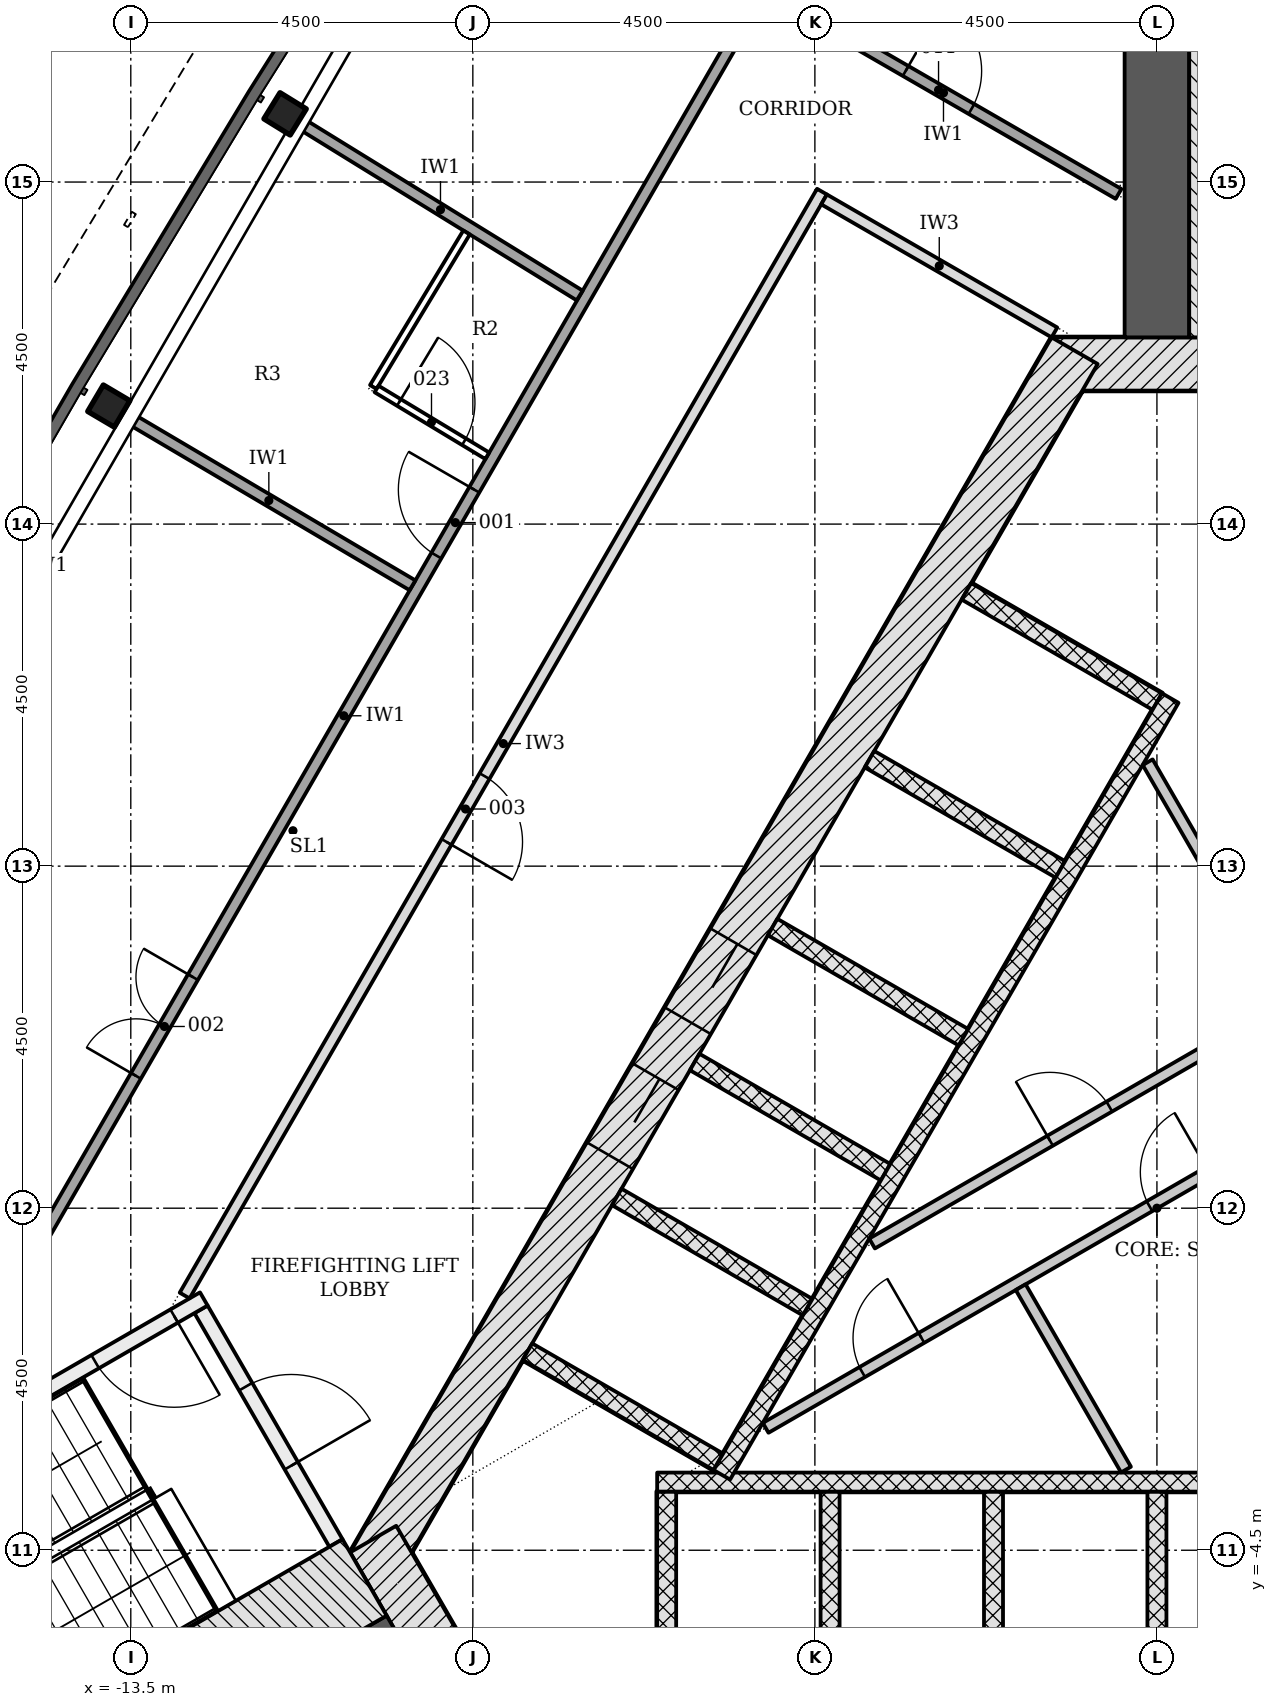
"""IFC4 building model, lengths in metres.
Left out: names, types, materials, properties, quantities, classifications, styles, units other than length and angle.
Written with IfcOpenShell. Run it as: python <this file> out.ifc"""

import sys

from ifc_helpers import new_model, si_unit, direction, frame, frame_2d, origin, origin_2d, place, context, subcontext, project, spatial, rectangle, i_section, extrude, element, fill, save


model = new_model("IFC4")
c1 = context("Model", 3, precision=1e-05, world=origin(), true_north=direction((0.0, 1.0)))
c2 = subcontext(c1, "Body", "Model", "MODEL_VIEW")
j1 = project(units=[si_unit("LENGTHUNIT", "METRE"), si_unit("PLANEANGLEUNIT", "RADIAN")], contexts=[c1])
p1 = place(None, origin())
s1 = spatial("IfcSite", under=j1, at=p1, CompositionType="ELEMENT")
p2 = place(p1, origin())
s2 = spatial("IfcBuilding", under=s1, at=p2, CompositionType="ELEMENT")
p3 = place(p2, frame((0.0, 0.0, 72.6)))
s3 = spatial("IfcBuildingStorey", under=s2, at=p3, CompositionType="ELEMENT", Elevation=72.6)
p4 = place(p3, frame((1.386, 11.106, -0.2), z_axis=(0.0, 0.0, 1.0), x_axis=(-1.0, 0.0, 0.0)))
e1 = element("IfcWall", 1, at=p4, inside=s3, PredefinedType="SHEAR", context=c2, shape_type="SweptSolid", body=[
    extrude(rectangle(XDim=2.771, YDim=0.7, at=frame_2d((1.386, 0.0))), origin(), (0.0, 0.0, 1.0), 3.6),
])
p5 = place(p3, frame((-1.083, 11.281, -0.2), z_axis=(0.0, 0.0, 1.0), x_axis=(-0.500001446645, -0.866024568562, 0.0)))
e2 = element("IfcWall", 2, at=p5, inside=s3, PredefinedType="SHEAR", context=c2, shape_type="SweptSolid", body=[
    extrude(rectangle(XDim=18.458, YDim=0.7, at=frame_2d((9.229, 0.0))), origin(), (0.0, 0.0, 1.0), 3.6),
])
p6 = place(p5, frame((8.979, 0.0, 0.2)))
e3 = element("IfcOpeningElement", 3, at=p6, cuts=e2, PredefinedType="OPENING", context=c2, shape_type="SweptSolid", body=[
    extrude(rectangle(XDim=1.2, YDim=2.1, at=frame_2d((0.6, 1.05))), frame((0.0, 0.36, 0.0), z_axis=(0.0, -1.0, 0.0), x_axis=(1.0, 0.0, 0.0)), (0.0, 0.0, 1.0), 0.72),
])
p7 = place(p5, frame((11.029, 0.0, 0.2)))
e4 = element("IfcOpeningElement", 4, at=p7, cuts=e2, PredefinedType="OPENING", context=c2, shape_type="SweptSolid", body=[
    extrude(rectangle(XDim=1.2, YDim=2.1, at=frame_2d((0.6, 1.05))), frame((0.0, 0.36, 0.0), z_axis=(0.0, -1.0, 0.0), x_axis=(1.0, 0.0, 0.0)), (0.0, 0.0, 1.0), 0.72),
])
p8 = place(p3, frame((-10.311, -4.353, -0.2), z_axis=(0.0, 0.0, 1.0), x_axis=(0.500042739161, -0.866000726912, 0.0)))
e5 = element("IfcWall", 5, at=p8, inside=s3, PredefinedType="SHEAR", context=c2, shape_type="SweptSolid", body=[
    extrude(rectangle(XDim=2.771, YDim=0.7, at=frame_2d((1.386, 0.0))), origin(), (0.0, 0.0, 1.0), 3.6),
])
p9 = place(p3, frame((0.0, 11.456, -0.2), z_axis=(0.0, 0.0, 1.0), x_axis=(0.0, 1.0, 0.0)))
e6 = element("IfcWall", 6, at=p9, inside=s3, PredefinedType="SHEAR", context=c2, shape_type="SweptSolid", body=[
    extrude(rectangle(XDim=13.382, YDim=0.85, at=frame_2d((6.691, 0.0))), origin(), (0.0, 0.0, 1.0), 3.6),
])
p10 = place(p3, frame((-9.922, -5.728, -0.2), z_axis=(0.0, 0.0, 1.0), x_axis=(-0.866026077102, -0.499998833779, 0.0)))
e7 = element("IfcWall", 7, at=p10, inside=s3, PredefinedType="SHEAR", context=c2, shape_type="SweptSolid", body=[
    extrude(rectangle(XDim=13.381, YDim=0.85, at=frame_2d((6.691, 0.0))), origin(), (0.0, 0.0, 1.0), 3.6),
])
for number, where, z_axis, x_axis in (
    (8, (-11.47, 14.397, -0.2), (0.0, 0.0, 1.0), (-0.525, -0.851, 0.0)),
    (9, (-13.789, 10.553, -0.2), (0.0, 0.0, 1.0), (-0.508, -0.861, 0.0)),
):
    element("IfcColumn", number, at=place(p3, frame(where, z_axis=z_axis, x_axis=x_axis)), inside=s3, PredefinedType="COLUMN", context=c2, shape_type="SweptSolid", body=[
        extrude(i_section(OverallWidth=0.404, OverallDepth=0.406, WebThickness=0.027, FlangeThickness=0.044, FilletRadius=0.015, at=origin_2d()), origin(), (0.0, 0.0, 1.0), 3.6),
    ])
for number, where, z_axis, x_axis in (
    (10, (-6.45, -6.228, -0.2), (0.0, 0.0, 1.0), (0.0, 1.0, 0.0)),
    (11, (-4.3, -6.228, -0.2), (0.0, 0.0, 1.0), (0.0, 1.0, 0.0)),
    (12, (-2.15, -6.228, -0.2), (0.0, 0.0, 1.0), (0.0, 1.0, 0.0)),
    (13, (0.0, -6.228, -0.2), (0.0, 0.0, 1.0), (0.0, 1.0, 0.0)),
):
    element("IfcWall", number, at=place(p3, frame(where, z_axis=z_axis, x_axis=x_axis)), inside=s3, PredefinedType="PARTITIONING", context=c2, shape_type="SweptSolid", body=[
        extrude(rectangle(XDim=2.5, YDim=0.25, at=frame_2d((1.25, 0.0))), origin(), (0.0, 0.0, 1.0), 3.6),
    ])
p11 = place(p3, frame((-6.575, -3.603, 0.0), z_axis=(0.0, 0.0, 1.0), x_axis=(1.0, 0.0, 0.0)))
e14 = element("IfcWall", 14, at=p11, inside=s3, PredefinedType="PARTITIONING", context=c2, shape_type="SweptSolid", body=[
    extrude(rectangle(XDim=13.15, YDim=0.25, at=frame_2d((6.575, 0.0))), origin(), (0.0, 0.0, 1.0), 3.4),
])
p12 = place(p3, frame((-2.506, 8.115, -0.2), z_axis=(0.0, 0.0, 1.0), x_axis=(0.865996321171, -0.50005036918, 0.0)))
e15 = element("IfcWall", 15, at=p12, inside=s3, PredefinedType="PARTITIONING", context=c2, shape_type="SweptSolid", body=[
    extrude(rectangle(XDim=2.9, YDim=0.25, at=frame_2d((1.45, 0.0))), origin(), (0.0, 0.0, 1.0), 3.6),
])
for number, where, z_axis, x_axis in (
    (16, (-3.781, 5.907, -0.2), (0.0, 0.0, 1.0), (0.866, -0.5, 0.0)),
    (17, (-5.056, 3.699, -0.2), (0.0, 0.0, 1.0), (0.866, -0.5, 0.0)),
    (18, (-6.081, 1.923, -0.2), (0.0, 0.0, 1.0), (0.866, -0.5, 0.0)),
    (19, (-7.106, 0.148, -0.2), (0.0, 0.0, 1.0), (0.866, -0.5, 0.0)),
    (20, (-8.281, -1.887, -0.2), (0.0, 0.0, 1.0), (0.866, -0.5, 0.0)),
):
    element("IfcWall", number, at=place(p3, frame(where, z_axis=z_axis, x_axis=x_axis)), inside=s3, PredefinedType="PARTITIONING", context=c2, shape_type="SweptSolid", body=[
        extrude(rectangle(XDim=2.9, YDim=0.25, at=frame_2d((1.45, 0.0))), origin(), (0.0, 0.0, 1.0), 3.6),
    ])
p13 = place(p3, frame((0.176, 6.711, 0.0), z_axis=(0.0, 0.0, 1.0), x_axis=(-0.500004227369, -0.866022963098, 0.0)))
e21 = element("IfcWall", 21, at=p13, inside=s3, PredefinedType="PARTITIONING", context=c2, shape_type="SweptSolid", body=[
    extrude(rectangle(XDim=11.8, YDim=0.25, at=frame_2d((5.9, 0.0))), origin(), (0.0, 0.0, 1.0), 3.4),
])
p14 = place(p3, frame((-5.148, -2.89, 0.0), z_axis=(0.0, 0.0, 1.0), x_axis=(0.866030081544, 0.499991897794, 0.0)))
e22 = element("IfcWall", 22, at=p14, inside=s3, PredefinedType="PARTITIONING", context=c2, shape_type="SweptSolid", body=[
    extrude(rectangle(XDim=12.131, YDim=0.15, at=frame_2d((6.065, 0.0))), origin(), (0.0, 0.0, 1.0), 3.4),
])
p15 = place(p14, frame((5.831, 0.0, 0.0)))
e23 = element("IfcOpeningElement", 23, at=p15, cuts=e22, PredefinedType="OPENING", context=c2, shape_type="SweptSolid", body=[
    extrude(rectangle(XDim=0.9, YDim=2.1, at=frame_2d((0.45, 1.05))), frame((0.0, 0.085, 0.0), z_axis=(0.0, -1.0, 0.0), x_axis=(1.0, 0.0, 0.0)), (0.0, 0.0, 1.0), 0.17),
])
p16 = place(p14, frame((1.467, 0.0, 0.0)))
e24 = element("IfcOpeningElement", 24, at=p16, cuts=e22, PredefinedType="OPENING", context=c2, shape_type="SweptSolid", body=[
    extrude(rectangle(XDim=0.9, YDim=2.1, at=frame_2d((0.45, 1.05))), frame((0.0, 0.085, 0.0), z_axis=(0.0, -1.0, 0.0), x_axis=(1.0, 0.0, 0.0)), (0.0, 0.0, 1.0), 0.17),
])
p17 = place(p3, frame((-3.748, -0.465, 0.0), z_axis=(0.0, 0.0, 1.0), x_axis=(0.866033540873, 0.499985905884, 0.0)))
e25 = element("IfcWall", 25, at=p17, inside=s3, PredefinedType="PARTITIONING", context=c2, shape_type="SweptSolid", body=[
    extrude(rectangle(XDim=9.706, YDim=0.15, at=frame_2d((4.853, 0.0))), origin(), (0.0, 0.0, 1.0), 3.4),
])
p18 = place(p17, frame((2.704, 0.0, 0.0)))
e26 = element("IfcOpeningElement", 26, at=p18, cuts=e25, PredefinedType="OPENING", context=c2, shape_type="SweptSolid", body=[
    extrude(rectangle(XDim=0.9, YDim=2.1, at=frame_2d((0.45, 1.05))), frame((0.0, 0.085, 0.0), z_axis=(0.0, -1.0, 0.0), x_axis=(1.0, 0.0, 0.0)), (0.0, 0.0, 1.0), 0.17),
])
p19 = place(p3, frame((1.526, 3.013, 0.0), z_axis=(0.0, 0.0, 1.0), x_axis=(-0.499978925887, 0.866037570588, 0.0)))
e27 = element("IfcWall", 27, at=p19, inside=s3, PredefinedType="PARTITIONING", context=c2, shape_type="SweptSolid", body=[
    extrude(rectangle(XDim=3.296, YDim=0.15, at=frame_2d((1.648, 0.0))), origin(), (0.0, 0.0, 1.0), 3.4),
])
p20 = place(p3, frame((-0.407, -3.439, 0.0), z_axis=(0.0, 0.0, 1.0), x_axis=(-0.500004591975, 0.86602275259, 0.0)))
e28 = element("IfcWall", 28, at=p20, inside=s3, PredefinedType="PARTITIONING", context=c2, shape_type="SweptSolid", body=[
    extrude(rectangle(XDim=2.771, YDim=0.15, at=frame_2d((1.386, 0.0))), origin(), (0.0, 0.0, 1.0), 3.4),
])
p21 = place(p3, frame((1.005, 11.456, -0.2), z_axis=(0.0, 0.0, 1.0), x_axis=(0.0, 1.0, 0.0)))
e29 = element("IfcWall", 29, at=p21, inside=s3, PredefinedType="SHEAR", context=c2, shape_type="SweptSolid", body=[
    extrude(rectangle(XDim=7.2, YDim=1.161, at=frame_2d((3.6, 0.0))), origin(), (0.0, 0.0, 1.0), 3.6),
])
p22 = place(p3, frame((-12.576, -1.331, -0.2), z_axis=(0.0, 0.0, 1.0), x_axis=(0.499970499736, -0.8660424351, 0.0)))
e30 = element("IfcWall", 30, at=p22, inside=s3, PredefinedType="SHEAR", context=c2, shape_type="SweptSolid", body=[
    extrude(rectangle(XDim=3.55, YDim=0.2, at=frame_2d((1.775, 0.0))), origin(), (0.0, 0.0, 1.0), 3.6),
])
p23 = place(p22, frame((1.175, 0.0, 0.2)))
e31 = element("IfcOpeningElement", 31, at=p23, cuts=e30, PredefinedType="OPENING", context=c2, shape_type="SweptSolid", body=[
    extrude(rectangle(XDim=1.2, YDim=2.1, at=frame_2d((0.6, 1.05))), frame((0.0, 0.11, 0.0), z_axis=(0.0, -1.0, 0.0), x_axis=(1.0, 0.0, 0.0)), (0.0, 0.0, 1.0), 0.22),
])
p24 = place(p3, frame((-12.539, -1.194, -0.2), z_axis=(0.0, 0.0, 1.0), x_axis=(-0.866045472092, -0.499965239061, 0.0)))
e32 = element("IfcWall", 32, at=p24, inside=s3, PredefinedType="SHEAR", context=c2, shape_type="SweptSolid", body=[
    extrude(rectangle(XDim=5.6, YDim=0.2, at=frame_2d((2.8, 0.0))), origin(), (0.0, 0.0, 1.0), 3.6),
])
p25 = place(p24, frame((0.45, 0.0, 0.2)))
e33 = element("IfcOpeningElement", 33, at=p25, cuts=e32, PredefinedType="OPENING", context=c2, shape_type="SweptSolid", body=[
    extrude(rectangle(XDim=1.2, YDim=2.1, at=frame_2d((0.6, 1.05))), frame((0.0, 0.11, 0.0), z_axis=(0.0, -1.0, 0.0), x_axis=(1.0, 0.0, 0.0)), (0.0, 0.0, 1.0), 0.22),
])
p26 = place(p3, frame((-10.424, -4.858, -0.2), z_axis=(0.0, 0.0, 1.0), x_axis=(-0.866033125095, -0.499986626058, 0.0)))
e34 = element("IfcWall", 34, at=p26, inside=s3, PredefinedType="SHEAR", context=c2, shape_type="SweptSolid", body=[
    extrude(rectangle(XDim=7.2, YDim=1.161, at=frame_2d((3.6, 0.0))), origin(), (0.0, 0.0, 1.0), 3.6),
])
p27 = place(p3, frame((-16.256, -3.149, 0.0), z_axis=(0.0, 0.0, 1.0), x_axis=(0.499999683919, 0.866025586274, 0.0)))
e35 = element("IfcWall", 35, at=p27, inside=s3, PredefinedType="PARTITIONING", context=c2, shape_type="SweptSolid", body=[
    extrude(rectangle(XDim=22.234, YDim=0.15, at=frame_2d((11.117, 0.0))), origin(), (0.0, 0.0, 1.0), 2.778),
])
p28 = place(p27, frame((13.551, 0.0, 0.0)))
e36 = element("IfcOpeningElement", 36, at=p28, cuts=e35, PredefinedType="OPENING", context=c2, shape_type="SweptSolid", body=[
    extrude(rectangle(XDim=1.0, YDim=2.1, at=frame_2d((0.5, 1.05))), frame((0.0, 0.085, 0.0), z_axis=(0.0, -1.0, 0.0), x_axis=(1.0, 0.0, 0.0)), (0.0, 0.0, 1.0), 0.17),
])
p29 = place(p27, frame((5.647, 0.0, 0.0)))
e37 = element("IfcOpeningElement", 37, at=p29, cuts=e35, PredefinedType="OPENING", context=c2, shape_type="SweptSolid", body=[
    extrude(rectangle(XDim=1.5, YDim=2.1, at=frame_2d((0.75, 1.05))), frame((0.0, 0.085, 0.0), z_axis=(0.0, -1.0, 0.0), x_axis=(1.0, 0.0, 0.0)), (0.0, 0.0, 1.0), 0.17),
])
p30 = place(p3, frame((-4.407, 13.374, 0.0), z_axis=(0.0, 0.0, 1.0), x_axis=(-0.499997181693, -0.866027030928, 0.0)))
e38 = element("IfcWall", 38, at=p30, inside=s3, PredefinedType="PARTITIONING", context=c2, shape_type="SweptSolid", body=[
    extrude(rectangle(XDim=16.77, YDim=0.15, at=frame_2d((8.385, 0.0))), origin(), (0.0, 0.0, 1.0), 2.778),
])
p31 = place(p30, frame((8.879, 0.0, 0.0)))
e39 = element("IfcOpeningElement", 39, at=p31, cuts=e38, PredefinedType="OPENING", context=c2, shape_type="SweptSolid", body=[
    extrude(rectangle(XDim=1.0, YDim=2.1, at=frame_2d((0.5, 1.05))), frame((0.0, 0.085, 0.0), z_axis=(0.0, -1.0, 0.0), x_axis=(1.0, 0.0, 0.0)), (0.0, 0.0, 1.0), 0.17),
])
p32 = place(p3, frame((-5.111, 16.003, 0.0), z_axis=(0.0, 0.0, 1.0), x_axis=(0.866034245675, -0.499984685083, 0.0)))
e40 = element("IfcWall", 40, at=p32, inside=s3, PredefinedType="PARTITIONING", context=c2, shape_type="SweptSolid", body=[
    extrude(rectangle(XDim=5.319, YDim=0.15, at=frame_2d((2.66, 0.0))), origin(), (0.0, 0.0, 1.0), 3.4),
])
p33 = place(p32, frame((2.084, 0.0, 0.0)))
e41 = element("IfcOpeningElement", 41, at=p33, cuts=e40, PredefinedType="OPENING", context=c2, shape_type="SweptSolid", body=[
    extrude(rectangle(XDim=1.0, YDim=2.1, at=frame_2d((0.5, 1.05))), frame((0.0, 0.085, 0.0), z_axis=(0.0, -1.0, 0.0), x_axis=(1.0, 0.0, 0.0)), (0.0, 0.0, 1.0), 0.17),
])
p34 = place(p3, frame((-4.379, 13.271, 0.0), z_axis=(0.0, 0.0, 1.0), x_axis=(0.866019471182, -0.500010275428, 0.0)))
e42 = element("IfcWall", 42, at=p34, inside=s3, PredefinedType="PARTITIONING", context=c2, shape_type="SweptSolid", body=[
    extrude(rectangle(XDim=3.5, YDim=0.15, at=frame_2d((1.75, 0.0))), origin(), (0.0, 0.0, 1.0), 3.4),
])
p35 = place(p3, frame((-13.574, 10.426, 0.0), z_axis=(0.0, 0.0, 1.0), x_axis=(0.861161165873, -0.508332023772, 0.0)))
e43 = element("IfcWall", 43, at=p35, inside=s3, PredefinedType="PARTITIONING", context=c2, shape_type="SweptSolid", body=[
    extrude(rectangle(XDim=4.39, YDim=0.15, at=frame_2d((2.195, 0.0))), origin(), (0.0, 0.0, 1.0), 2.778),
])
p36 = place(p3, frame((-11.257, 14.266, 0.0), z_axis=(0.0, 0.0, 1.0), x_axis=(0.851192414307, -0.524853764231, 0.0)))
e44 = element("IfcWall", 44, at=p36, inside=s3, PredefinedType="PARTITIONING", context=c2, shape_type="SweptSolid", body=[
    extrude(rectangle(XDim=4.303, YDim=0.15, at=frame_2d((2.152, 0.0))), origin(), (0.0, 0.0, 1.0), 2.778),
])
p37 = place(p3, frame((-9.083, 12.836, 0.0), z_axis=(0.0, 0.0, 1.0), x_axis=(-0.516596087141, -0.856229223252, 0.0)))
e45 = element("IfcWall", 45, at=p37, inside=s3, PredefinedType="PARTITIONING", context=c2, shape_type="SweptSolid", body=[
    extrude(rectangle(XDim=2.374, YDim=0.1, at=frame_2d((1.187, 0.0))), origin(), (0.0, 0.0, 1.0), 2.778),
])
p38 = place(p3, frame((-10.267, 10.778, 0.0), z_axis=(0.0, 0.0, 1.0), x_axis=(0.856198606516, -0.516646829275, 0.0)))
e46 = element("IfcWall", 46, at=p38, inside=s3, PredefinedType="PARTITIONING", context=c2, shape_type="SweptSolid", body=[
    extrude(rectangle(XDim=1.701, YDim=0.1, at=frame_2d((0.851, 0.0))), origin(), (0.0, 0.0, 1.0), 3.4),
])
p39 = place(p38, frame((0.344, 0.0, 0.0)))
e47 = element("IfcOpeningElement", 47, at=p39, cuts=e46, PredefinedType="OPENING", context=c2, shape_type="SweptSolid", body=[
    extrude(rectangle(XDim=1.0, YDim=2.1, at=frame_2d((0.5, 1.05))), frame((0.0, 0.06, 0.0), z_axis=(0.0, -1.0, 0.0), x_axis=(1.0, 0.0, 0.0)), (0.0, 0.0, 1.0), 0.12),
])
p40 = place(p6, origin())
e48 = element("IfcDoor", 48, at=p40, inside=s3, OperationType="DOUBLE_DOOR_SLIDING", PredefinedType="DOOR", context=c2, shape_type="SweptSolid", body=[
    extrude(rectangle(XDim=1.2, YDim=2.1, at=frame_2d((0.6, 1.05))), frame((0.0, 0.025, 0.0), z_axis=(0.0, -1.0, 0.0), x_axis=(1.0, 0.0, 0.0)), (0.0, 0.0, 1.0), 0.05),
])
fill(e3, e48)
p41 = place(p7, origin())
e49 = element("IfcDoor", 49, at=p41, inside=s3, OperationType="DOUBLE_DOOR_SLIDING", PredefinedType="DOOR", context=c2, shape_type="SweptSolid", body=[
    extrude(rectangle(XDim=1.2, YDim=2.1, at=frame_2d((0.6, 1.05))), frame((0.0, 0.025, 0.0), z_axis=(0.0, -1.0, 0.0), x_axis=(1.0, 0.0, 0.0)), (0.0, 0.0, 1.0), 0.05),
])
fill(e4, e49)
p42 = place(p15, origin())
e50 = element("IfcDoor", 50, at=p42, inside=s3, OperationType="SINGLE_SWING_RIGHT", PredefinedType="DOOR", context=c2, shape_type="SweptSolid", body=[
    extrude(rectangle(XDim=0.9, YDim=2.1, at=frame_2d((0.45, 1.05))), frame((0.0, 0.025, 0.0), z_axis=(0.0, -1.0, 0.0), x_axis=(1.0, 0.0, 0.0)), (0.0, 0.0, 1.0), 0.05),
])
fill(e23, e50)
p43 = place(p18, origin())
e51 = element("IfcDoor", 51, at=p43, inside=s3, OperationType="SINGLE_SWING_LEFT", PredefinedType="DOOR", context=c2, shape_type="SweptSolid", body=[
    extrude(rectangle(XDim=0.9, YDim=2.1, at=frame_2d((0.45, 1.05))), frame((0.0, 0.025, 0.0), z_axis=(0.0, -1.0, 0.0), x_axis=(1.0, 0.0, 0.0)), (0.0, 0.0, 1.0), 0.05),
])
fill(e26, e51)
p44 = place(p16, origin())
e52 = element("IfcDoor", 52, at=p44, inside=s3, OperationType="SINGLE_SWING_RIGHT", PredefinedType="DOOR", context=c2, shape_type="SweptSolid", body=[
    extrude(rectangle(XDim=0.9, YDim=2.1, at=frame_2d((0.45, 1.05))), frame((0.0, 0.025, 0.0), z_axis=(0.0, -1.0, 0.0), x_axis=(1.0, 0.0, 0.0)), (0.0, 0.0, 1.0), 0.05),
])
fill(e24, e52)
p45 = place(p23, origin())
e53 = element("IfcDoor", 53, at=p45, inside=s3, OperationType="SINGLE_SWING_RIGHT", PredefinedType="DOOR", context=c2, shape_type="SweptSolid", body=[
    extrude(rectangle(XDim=1.2, YDim=2.1, at=frame_2d((0.6, 1.05))), frame((0.0, 0.025, 0.0), z_axis=(0.0, -1.0, 0.0), x_axis=(1.0, 0.0, 0.0)), (0.0, 0.0, 1.0), 0.05),
])
fill(e31, e53)
p46 = place(p25, origin())
e54 = element("IfcDoor", 54, at=p46, inside=s3, OperationType="SINGLE_SWING_LEFT", PredefinedType="DOOR", context=c2, shape_type="SweptSolid", body=[
    extrude(rectangle(XDim=1.2, YDim=2.1, at=frame_2d((0.6, 1.05))), frame((0.0, 0.025, 0.0), z_axis=(0.0, -1.0, 0.0), x_axis=(1.0, 0.0, 0.0)), (0.0, 0.0, 1.0), 0.05),
])
fill(e33, e54)
p47 = place(p28, origin())
e55 = element("IfcDoor", 55, at=p47, inside=s3, OperationType="SINGLE_SWING_RIGHT", PredefinedType="DOOR", context=c2, shape_type="SweptSolid", body=[
    extrude(rectangle(XDim=1.0, YDim=2.1, at=frame_2d((0.5, 1.05))), frame((0.0, 0.025, 0.0), z_axis=(0.0, -1.0, 0.0), x_axis=(1.0, 0.0, 0.0)), (0.0, 0.0, 1.0), 0.05),
])
fill(e36, e55)
p48 = place(p29, origin())
e56 = element("IfcDoor", 56, at=p48, inside=s3, OperationType="DOUBLE_DOOR_SINGLE_SWING", PredefinedType="DOOR", context=c2, shape_type="SweptSolid", body=[
    extrude(rectangle(XDim=1.5, YDim=2.1, at=frame_2d((0.75, 1.05))), frame((0.0, 0.025, 0.0), z_axis=(0.0, -1.0, 0.0), x_axis=(1.0, 0.0, 0.0)), (0.0, 0.0, 1.0), 0.05),
])
fill(e37, e56)
p49 = place(p31, origin())
e57 = element("IfcDoor", 57, at=p49, inside=s3, OperationType="SINGLE_SWING_RIGHT", PredefinedType="DOOR", context=c2, shape_type="SweptSolid", body=[
    extrude(rectangle(XDim=1.0, YDim=2.1, at=frame_2d((0.5, 1.05))), frame((0.0, 0.025, 0.0), z_axis=(0.0, -1.0, 0.0), x_axis=(1.0, 0.0, 0.0)), (0.0, 0.0, 1.0), 0.05),
])
fill(e39, e57)
p50 = place(p33, origin())
e58 = element("IfcDoor", 58, at=p50, inside=s3, OperationType="SINGLE_SWING_LEFT", PredefinedType="DOOR", context=c2, shape_type="SweptSolid", body=[
    extrude(rectangle(XDim=1.0, YDim=2.1, at=frame_2d((0.5, 1.05))), frame((0.0, 0.025, 0.0), z_axis=(0.0, -1.0, 0.0), x_axis=(1.0, 0.0, 0.0)), (0.0, 0.0, 1.0), 0.05),
])
fill(e41, e58)
p51 = place(p39, origin())
e59 = element("IfcDoor", 59, at=p51, inside=s3, OperationType="SINGLE_SWING_LEFT", PredefinedType="DOOR", context=c2, shape_type="SweptSolid", body=[
    extrude(rectangle(XDim=1.0, YDim=2.1, at=frame_2d((0.5, 1.05))), frame((0.0, 0.025, 0.0), z_axis=(0.0, -1.0, 0.0), x_axis=(1.0, 0.0, 0.0)), (0.0, 0.0, 1.0), 0.05),
])
fill(e47, e59)
save(model, sys.argv[1])
